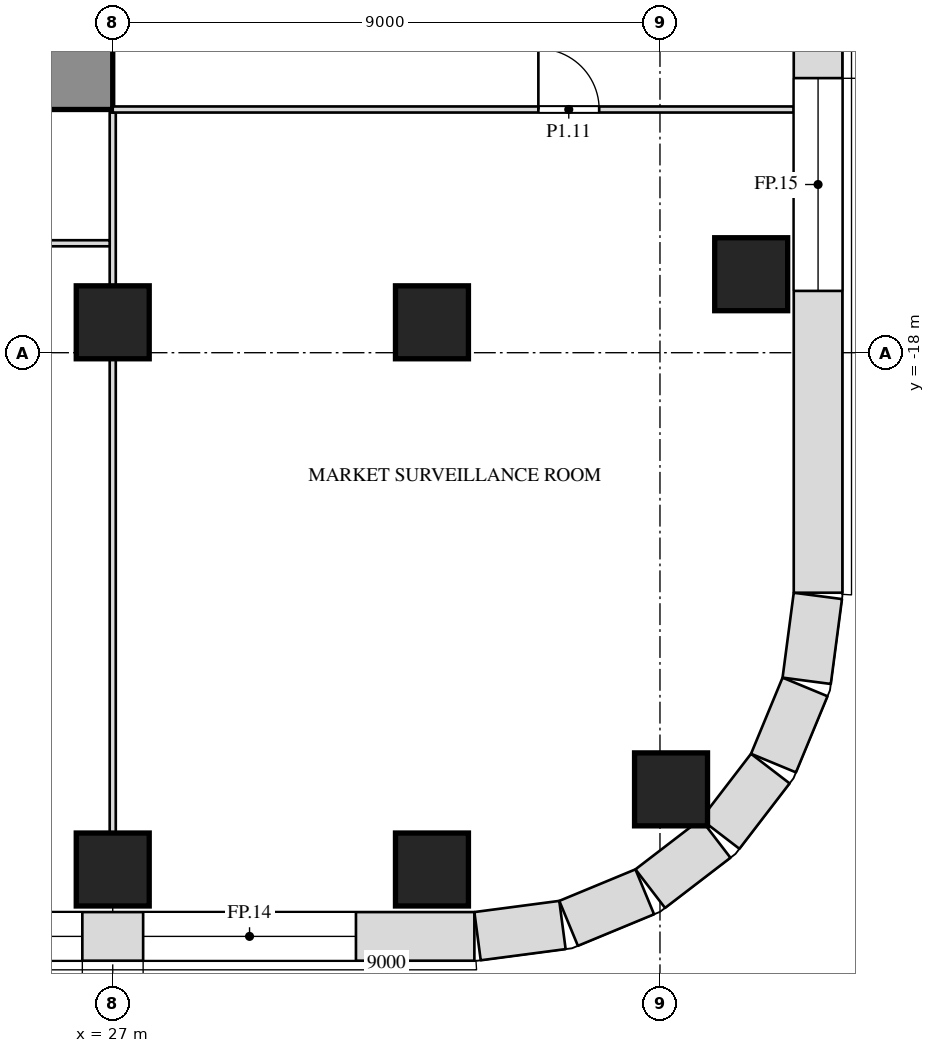
"""IFC4 building model, lengths in metres.
Left out: names, types, materials, properties, quantities, classifications, styles, units other than length and angle.
Written with IfcOpenShell. Run it as: python <this file> out.ifc"""

import sys

from ifc_helpers import new_model, si_unit, direction, frame, frame_2d, origin, origin_2d, place, context, subcontext, project, spatial, rectangle, extrude, element, fill, save


model = new_model("IFC4")
c1 = context("Model", 3, precision=1e-05, world=origin(), true_north=direction((0.0, 1.0)))
c2 = subcontext(c1, "Body", "Model", "MODEL_VIEW")
j1 = project(units=[si_unit("LENGTHUNIT", "METRE"), si_unit("PLANEANGLEUNIT", "RADIAN")], contexts=[c1])
p1 = place(None, origin())
s1 = spatial("IfcSite", under=j1, at=p1, CompositionType="ELEMENT")
p2 = place(p1, origin())
s2 = spatial("IfcBuilding", under=s1, at=p2, CompositionType="ELEMENT")
p3 = place(p2, frame((0.0, 0.0, 9.0)))
s3 = spatial("IfcBuildingStorey", under=s2, at=p3, CompositionType="ELEMENT", Elevation=9.0)
for number, where, z_axis, x_axis in (
    (1, (27.0, -26.5, 0.0), (0.0, 0.0, 1.0), (1.0, 0.0, 0.0)),
    (2, (32.25, -26.5, 0.0), (0.0, 0.0, 1.0), (1.0, 0.0, 0.0)),
    (3, (36.182, -25.182, 0.0), (0.0, 0.0, 1.0), (1.0, 0.0, 0.0)),
    (4, (27.0, -17.5, 0.0), (0.0, 0.0, 1.0), (1.0, 0.0, 0.0)),
    (5, (32.25, -17.5, 0.0), (0.0, 0.0, 1.0), (1.0, 0.0, 0.0)),
    (6, (37.5, -16.709, 0.0), (0.0, 0.0, 1.0), (1.0, 0.0, 0.0)),
):
    element("IfcColumn", number, at=place(p3, frame(where, z_axis=z_axis, x_axis=x_axis)), inside=s3, PredefinedType="COLUMN", context=c2, shape_type="SweptSolid", body=[
        extrude(rectangle(XDim=1.2, YDim=1.2, at=origin_2d()), origin(), (0.0, 0.0, 1.0), 6.0),
    ])
p4 = place(p3, frame((-27.0, -13.4, 0.0), z_axis=(0.0, 0.0, 1.0), x_axis=(1.0, 0.0, 0.0)))
e7 = element("IfcWall", 7, at=p4, inside=s3, PredefinedType="SHEAR", context=c2, shape_type="SweptSolid", body=[
    extrude(rectangle(XDim=54.0, YDim=1.2, at=frame_2d((27.0, 0.0))), origin(), (0.0, 0.0, 1.0), 5.7),
])
p5 = place(p4, frame((16.45, 0.0, 0.0)))
e8 = element("IfcOpeningElement", 8, at=p5, cuts=e7, PredefinedType="OPENING", context=c2, shape_type="SweptSolid", body=[
    extrude(rectangle(XDim=1.0, YDim=2.1, at=frame_2d((0.5, 1.05))), frame((0.0, 0.612, 0.0), z_axis=(0.0, -1.0, 0.0), x_axis=(1.0, 0.0, 0.0)), (0.0, 0.0, 1.0), 1.224),
])
p6 = place(p4, frame((36.55, 0.0, 0.0)))
e9 = element("IfcOpeningElement", 9, at=p6, cuts=e7, PredefinedType="OPENING", context=c2, shape_type="SweptSolid", body=[
    extrude(rectangle(XDim=1.0, YDim=2.1, at=frame_2d((0.5, 1.05))), frame((0.0, 0.612, 0.0), z_axis=(0.0, -1.0, 0.0), x_axis=(1.0, 0.0, 0.0)), (0.0, 0.0, 1.0), 1.224),
])
p7 = place(p3, frame((27.0, -25.9, 0.0), z_axis=(0.0, 0.0, 1.0), x_axis=(0.0, 1.0, 0.0)))
e10 = element("IfcWall", 10, at=p7, inside=s3, PredefinedType="PARTITIONING", context=c2, shape_type="SweptSolid", body=[
    extrude(rectangle(XDim=7.8, YDim=0.1, at=frame_2d((3.9, 0.0))), origin(), (0.0, 0.0, 1.0), 5.088),
])
p8 = place(p3, frame((27.0, -16.9, 0.0), z_axis=(0.0, 0.0, 1.0), x_axis=(0.0, 1.0, 0.0)))
e11 = element("IfcWall", 11, at=p8, inside=s3, PredefinedType="PARTITIONING", context=c2, shape_type="SweptSolid", body=[
    extrude(rectangle(XDim=2.85, YDim=0.1, at=frame_2d((1.425, 0.0))), origin(), (0.0, 0.0, 1.0), 5.088),
])
p9 = place(p3, frame((17.925, -16.2, 0.0), z_axis=(0.0, 0.0, 1.0), x_axis=(1.0, 0.0, 0.0)))
e12 = element("IfcWall", 12, at=p9, inside=s3, PredefinedType="PARTITIONING", context=c2, shape_type="SweptSolid", body=[
    extrude(rectangle(XDim=9.025, YDim=0.1, at=frame_2d((4.512, 0.0))), origin(), (0.0, 0.0, 1.0), 5.7),
])
p10 = place(p9, frame((4.075, 0.0, 0.0)))
e13 = element("IfcOpeningElement", 13, at=p10, cuts=e12, PredefinedType="OPENING", context=c2, shape_type="SweptSolid", body=[
    extrude(rectangle(XDim=1.0, YDim=2.1, at=frame_2d((0.5, 1.05))), frame((0.0, 0.062, 0.0), z_axis=(0.0, -1.0, 0.0), x_axis=(1.0, 0.0, 0.0)), (0.0, 0.0, 1.0), 0.124),
])
p11 = place(p3, frame((27.0, -14.0, 0.0), z_axis=(0.0, 0.0, 1.0), x_axis=(1.0, 0.0, 0.0)))
e14 = element("IfcWall", 14, at=p11, inside=s3, PredefinedType="PARTITIONING", context=c2, shape_type="SweptSolid", body=[
    extrude(rectangle(XDim=11.2, YDim=0.1, at=frame_2d((5.6, 0.0))), origin(), (0.0, 0.0, 1.0), 5.7),
])
p12 = place(p11, frame((7.0, 0.0, 0.0)))
e15 = element("IfcOpeningElement", 15, at=p12, cuts=e14, PredefinedType="OPENING", context=c2, shape_type="SweptSolid", body=[
    extrude(rectangle(XDim=1.0, YDim=2.1, at=frame_2d((0.5, 1.05))), frame((0.0, 0.062, 0.0), z_axis=(0.0, -1.0, 0.0), x_axis=(1.0, 0.0, 0.0)), (0.0, 0.0, 1.0), 0.124),
])
p13 = place(p3, frame((-32.948, -27.6, 0.0), z_axis=(0.0, 0.0, 1.0), x_axis=(1.0, 0.0, 0.0)))
e16 = element("IfcWall", 16, at=p13, inside=s3, PredefinedType="SOLIDWALL", context=c2, shape_type="SweptSolid", body=[
    extrude(rectangle(XDim=65.895, YDim=0.8, at=frame_2d((32.948, 0.0))), origin(), (0.0, 0.0, 1.0), 5.7),
])
p14 = place(p13, frame((1.948, 0.0, 1.0)))
e17 = element("IfcOpeningElement", 17, at=p14, cuts=e16, PredefinedType="OPENING", context=c2, shape_type="SweptSolid", body=[
    extrude(rectangle(XDim=3.5, YDim=4.0, at=frame_2d((1.75, 2.0))), frame((0.0, 0.412, 0.0), z_axis=(0.0, -1.0, 0.0), x_axis=(1.0, 0.0, 0.0)), (0.0, 0.0, 1.0), 0.824),
])
p15 = place(p13, frame((6.448, 0.0, 1.0)))
e18 = element("IfcOpeningElement", 18, at=p15, cuts=e16, PredefinedType="OPENING", context=c2, shape_type="SweptSolid", body=[
    extrude(rectangle(XDim=3.5, YDim=4.0, at=frame_2d((1.75, 2.0))), frame((0.0, 0.412, 0.0), z_axis=(0.0, -1.0, 0.0), x_axis=(1.0, 0.0, 0.0)), (0.0, 0.0, 1.0), 0.824),
])
p16 = place(p13, frame((10.948, 0.0, 1.0)))
e19 = element("IfcOpeningElement", 19, at=p16, cuts=e16, PredefinedType="OPENING", context=c2, shape_type="SweptSolid", body=[
    extrude(rectangle(XDim=3.5, YDim=4.0, at=frame_2d((1.75, 2.0))), frame((0.0, 0.412, 0.0), z_axis=(0.0, -1.0, 0.0), x_axis=(1.0, 0.0, 0.0)), (0.0, 0.0, 1.0), 0.824),
])
p17 = place(p13, frame((15.448, 0.0, 1.0)))
e20 = element("IfcOpeningElement", 20, at=p17, cuts=e16, PredefinedType="OPENING", context=c2, shape_type="SweptSolid", body=[
    extrude(rectangle(XDim=3.5, YDim=4.0, at=frame_2d((1.75, 2.0))), frame((0.0, 0.412, 0.0), z_axis=(0.0, -1.0, 0.0), x_axis=(1.0, 0.0, 0.0)), (0.0, 0.0, 1.0), 0.824),
])
p18 = place(p13, frame((19.948, 0.0, 1.0)))
e21 = element("IfcOpeningElement", 21, at=p18, cuts=e16, PredefinedType="OPENING", context=c2, shape_type="SweptSolid", body=[
    extrude(rectangle(XDim=3.5, YDim=4.0, at=frame_2d((1.75, 2.0))), frame((0.0, 0.412, 0.0), z_axis=(0.0, -1.0, 0.0), x_axis=(1.0, 0.0, 0.0)), (0.0, 0.0, 1.0), 0.824),
])
p19 = place(p13, frame((24.448, 0.0, 1.0)))
e22 = element("IfcOpeningElement", 22, at=p19, cuts=e16, PredefinedType="OPENING", context=c2, shape_type="SweptSolid", body=[
    extrude(rectangle(XDim=3.5, YDim=4.0, at=frame_2d((1.75, 2.0))), frame((0.0, 0.412, 0.0), z_axis=(0.0, -1.0, 0.0), x_axis=(1.0, 0.0, 0.0)), (0.0, 0.0, 1.0), 0.824),
])
p20 = place(p13, frame((28.948, 0.0, 1.0)))
e23 = element("IfcOpeningElement", 23, at=p20, cuts=e16, PredefinedType="OPENING", context=c2, shape_type="SweptSolid", body=[
    extrude(rectangle(XDim=3.5, YDim=4.0, at=frame_2d((1.75, 2.0))), frame((0.0, 0.412, 0.0), z_axis=(0.0, -1.0, 0.0), x_axis=(1.0, 0.0, 0.0)), (0.0, 0.0, 1.0), 0.824),
])
p21 = place(p13, frame((33.448, 0.0, 1.0)))
e24 = element("IfcOpeningElement", 24, at=p21, cuts=e16, PredefinedType="OPENING", context=c2, shape_type="SweptSolid", body=[
    extrude(rectangle(XDim=3.5, YDim=4.0, at=frame_2d((1.75, 2.0))), frame((0.0, 0.412, 0.0), z_axis=(0.0, -1.0, 0.0), x_axis=(1.0, 0.0, 0.0)), (0.0, 0.0, 1.0), 0.824),
])
p22 = place(p13, frame((37.948, 0.0, 1.0)))
e25 = element("IfcOpeningElement", 25, at=p22, cuts=e16, PredefinedType="OPENING", context=c2, shape_type="SweptSolid", body=[
    extrude(rectangle(XDim=3.5, YDim=4.0, at=frame_2d((1.75, 2.0))), frame((0.0, 0.412, 0.0), z_axis=(0.0, -1.0, 0.0), x_axis=(1.0, 0.0, 0.0)), (0.0, 0.0, 1.0), 0.824),
])
p23 = place(p13, frame((42.448, 0.0, 1.0)))
e26 = element("IfcOpeningElement", 26, at=p23, cuts=e16, PredefinedType="OPENING", context=c2, shape_type="SweptSolid", body=[
    extrude(rectangle(XDim=3.5, YDim=4.0, at=frame_2d((1.75, 2.0))), frame((0.0, 0.412, 0.0), z_axis=(0.0, -1.0, 0.0), x_axis=(1.0, 0.0, 0.0)), (0.0, 0.0, 1.0), 0.824),
])
p24 = place(p13, frame((46.948, 0.0, 1.0)))
e27 = element("IfcOpeningElement", 27, at=p24, cuts=e16, PredefinedType="OPENING", context=c2, shape_type="SweptSolid", body=[
    extrude(rectangle(XDim=3.5, YDim=4.0, at=frame_2d((1.75, 2.0))), frame((0.0, 0.412, 0.0), z_axis=(0.0, -1.0, 0.0), x_axis=(1.0, 0.0, 0.0)), (0.0, 0.0, 1.0), 0.824),
])
p25 = place(p13, frame((51.448, 0.0, 1.0)))
e28 = element("IfcOpeningElement", 28, at=p25, cuts=e16, PredefinedType="OPENING", context=c2, shape_type="SweptSolid", body=[
    extrude(rectangle(XDim=3.5, YDim=4.0, at=frame_2d((1.75, 2.0))), frame((0.0, 0.412, 0.0), z_axis=(0.0, -1.0, 0.0), x_axis=(1.0, 0.0, 0.0)), (0.0, 0.0, 1.0), 0.824),
])
p26 = place(p13, frame((55.948, 0.0, 1.0)))
e29 = element("IfcOpeningElement", 29, at=p26, cuts=e16, PredefinedType="OPENING", context=c2, shape_type="SweptSolid", body=[
    extrude(rectangle(XDim=3.5, YDim=4.0, at=frame_2d((1.75, 2.0))), frame((0.0, 0.412, 0.0), z_axis=(0.0, -1.0, 0.0), x_axis=(1.0, 0.0, 0.0)), (0.0, 0.0, 1.0), 0.824),
])
p27 = place(p13, frame((60.448, 0.0, 1.0)))
e30 = element("IfcOpeningElement", 30, at=p27, cuts=e16, PredefinedType="OPENING", context=c2, shape_type="SweptSolid", body=[
    extrude(rectangle(XDim=3.5, YDim=4.0, at=frame_2d((1.75, 2.0))), frame((0.0, 0.412, 0.0), z_axis=(0.0, -1.0, 0.0), x_axis=(1.0, 0.0, 0.0)), (0.0, 0.0, 1.0), 0.824),
])
p28 = place(p3, frame((33.0, -27.597, 0.0), z_axis=(0.0, 0.0, 1.0), x_axis=(0.99144603414, 0.130517283865, 0.0)))
e31 = element("IfcWall", 31, at=p28, inside=s3, PredefinedType="SOLIDWALL", context=c2, shape_type="SweptSolid", body=[
    extrude(rectangle(XDim=1.408, YDim=0.8, at=frame_2d((0.704, 0.0))), origin(), (0.0, 0.0, 1.0), 5.7),
])
p29 = place(p3, frame((34.497, -27.386, 0.0), z_axis=(0.0, 0.0, 1.0), x_axis=(0.923847774587, 0.38276009378, 0.0)))
e32 = element("IfcWall", 32, at=p29, inside=s3, PredefinedType="SOLIDWALL", context=c2, shape_type="SweptSolid", body=[
    extrude(rectangle(XDim=1.355, YDim=0.8, at=frame_2d((0.678, 0.0))), origin(), (0.0, 0.0, 1.0), 5.7),
])
for number, where, z_axis, x_axis in (
    (33, (35.84, -26.815, 0.0), (0.0, 0.0, 1.0), (0.793, 0.609, 0.0)),
    (34, (36.989, -25.916, 0.0), (0.0, 0.0, 1.0), (0.609, 0.793, 0.0)),
):
    element("IfcWall", number, at=place(p3, frame(where, z_axis=z_axis, x_axis=x_axis)), inside=s3, PredefinedType="SOLIDWALL", context=c2, shape_type="SweptSolid", body=[
        extrude(rectangle(XDim=1.356, YDim=0.8, at=frame_2d((0.678, 0.0))), origin(), (0.0, 0.0, 1.0), 5.7),
    ])
p30 = place(p3, frame((37.867, -24.75, 0.0), z_axis=(0.0, 0.0, 1.0), x_axis=(0.38276009378, 0.923847774587, 0.0)))
e35 = element("IfcWall", 35, at=p30, inside=s3, PredefinedType="SOLIDWALL", context=c2, shape_type="SweptSolid", body=[
    extrude(rectangle(XDim=1.355, YDim=0.8, at=frame_2d((0.678, 0.0))), origin(), (0.0, 0.0, 1.0), 5.7),
])
p31 = place(p3, frame((38.413, -23.396, 0.0), z_axis=(0.0, 0.0, 1.0), x_axis=(0.130517283865, 0.99144603414, 0.0)))
e36 = element("IfcWall", 36, at=p31, inside=s3, PredefinedType="SOLIDWALL", context=c2, shape_type="SweptSolid", body=[
    extrude(rectangle(XDim=1.408, YDim=0.8, at=frame_2d((0.704, 0.0))), origin(), (0.0, 0.0, 1.0), 5.7),
])
p32 = place(p3, frame((38.6, -21.948, 0.0), z_axis=(0.0, 0.0, 1.0), x_axis=(0.0, 1.0, 0.0)))
e37 = element("IfcWall", 37, at=p32, inside=s3, PredefinedType="SOLIDWALL", context=c2, shape_type="SweptSolid", body=[
    extrude(rectangle(XDim=35.895, YDim=0.8, at=frame_2d((17.948, 0.0))), origin(), (0.0, 0.0, 1.0), 5.7),
])
p33 = place(p32, frame((4.964, 0.0, 1.0)))
e38 = element("IfcOpeningElement", 38, at=p33, cuts=e37, PredefinedType="OPENING", context=c2, shape_type="SweptSolid", body=[
    extrude(rectangle(XDim=3.5, YDim=4.0, at=frame_2d((1.75, 2.0))), frame((0.0, 0.412, 0.0), z_axis=(0.0, -1.0, 0.0), x_axis=(1.0, 0.0, 0.0)), (0.0, 0.0, 1.0), 0.824),
])
p34 = place(p32, frame((9.458, 0.0, 1.0)))
e39 = element("IfcOpeningElement", 39, at=p34, cuts=e37, PredefinedType="OPENING", context=c2, shape_type="SweptSolid", body=[
    extrude(rectangle(XDim=3.5, YDim=4.0, at=frame_2d((1.75, 2.0))), frame((0.0, 0.412, 0.0), z_axis=(0.0, -1.0, 0.0), x_axis=(1.0, 0.0, 0.0)), (0.0, 0.0, 1.0), 0.824),
])
p35 = place(p32, frame((13.951, 0.0, 1.0)))
e40 = element("IfcOpeningElement", 40, at=p35, cuts=e37, PredefinedType="OPENING", context=c2, shape_type="SweptSolid", body=[
    extrude(rectangle(XDim=3.5, YDim=4.0, at=frame_2d((1.75, 2.0))), frame((0.0, 0.412, 0.0), z_axis=(0.0, -1.0, 0.0), x_axis=(1.0, 0.0, 0.0)), (0.0, 0.0, 1.0), 0.824),
])
p36 = place(p32, frame((18.444, 0.0, 1.0)))
e41 = element("IfcOpeningElement", 41, at=p36, cuts=e37, PredefinedType="OPENING", context=c2, shape_type="SweptSolid", body=[
    extrude(rectangle(XDim=3.5, YDim=4.0, at=frame_2d((1.75, 2.0))), frame((0.0, 0.412, 0.0), z_axis=(0.0, -1.0, 0.0), x_axis=(1.0, 0.0, 0.0)), (0.0, 0.0, 1.0), 0.824),
])
p37 = place(p32, frame((22.938, 0.0, 1.0)))
e42 = element("IfcOpeningElement", 42, at=p37, cuts=e37, PredefinedType="OPENING", context=c2, shape_type="SweptSolid", body=[
    extrude(rectangle(XDim=3.5, YDim=4.0, at=frame_2d((1.75, 2.0))), frame((0.0, 0.412, 0.0), z_axis=(0.0, -1.0, 0.0), x_axis=(1.0, 0.0, 0.0)), (0.0, 0.0, 1.0), 0.824),
])
p38 = place(p32, frame((27.431, 0.0, 1.0)))
e43 = element("IfcOpeningElement", 43, at=p38, cuts=e37, PredefinedType="OPENING", context=c2, shape_type="SweptSolid", body=[
    extrude(rectangle(XDim=3.5, YDim=4.0, at=frame_2d((1.75, 2.0))), frame((0.0, 0.412, 0.0), z_axis=(0.0, -1.0, 0.0), x_axis=(1.0, 0.0, 0.0)), (0.0, 0.0, 1.0), 0.824),
])
p39 = place(p12, origin())
e44 = element("IfcDoor", 44, at=p39, inside=s3, OperationType="SINGLE_SWING_LEFT", PredefinedType="DOOR", context=c2, shape_type="SweptSolid", body=[
    extrude(rectangle(XDim=1.0, YDim=2.1, at=frame_2d((0.5, 1.05))), frame((0.0, 0.025, 0.0), z_axis=(0.0, -1.0, 0.0), x_axis=(1.0, 0.0, 0.0)), (0.0, 0.0, 1.0), 0.05),
])
fill(e15, e44)
p40 = place(p26, origin())
e45 = element("IfcWindow", 45, at=p40, inside=s3, PartitioningType="SINGLE_PANEL", PredefinedType="WINDOW", context=c2, shape_type="SweptSolid", body=[
    extrude(rectangle(XDim=3.5, YDim=4.0, at=frame_2d((1.75, 2.0))), frame((0.0, 0.03, 0.0), z_axis=(0.0, -1.0, 0.0), x_axis=(1.0, 0.0, 0.0)), (0.0, 0.0, 1.0), 0.06),
])
fill(e29, e45)
p41 = place(p27, origin())
e46 = element("IfcWindow", 46, at=p41, inside=s3, PartitioningType="SINGLE_PANEL", PredefinedType="WINDOW", context=c2, shape_type="SweptSolid", body=[
    extrude(rectangle(XDim=3.5, YDim=4.0, at=frame_2d((1.75, 2.0))), frame((0.0, 0.03, 0.0), z_axis=(0.0, -1.0, 0.0), x_axis=(1.0, 0.0, 0.0)), (0.0, 0.0, 1.0), 0.06),
])
fill(e30, e46)
p42 = place(p33, origin())
e47 = element("IfcWindow", 47, at=p42, inside=s3, PartitioningType="SINGLE_PANEL", PredefinedType="WINDOW", context=c2, shape_type="SweptSolid", body=[
    extrude(rectangle(XDim=3.5, YDim=4.0, at=frame_2d((1.75, 2.0))), frame((0.0, 0.03, 0.0), z_axis=(0.0, -1.0, 0.0), x_axis=(1.0, 0.0, 0.0)), (0.0, 0.0, 1.0), 0.06),
])
fill(e38, e47)
save(model, sys.argv[1])
